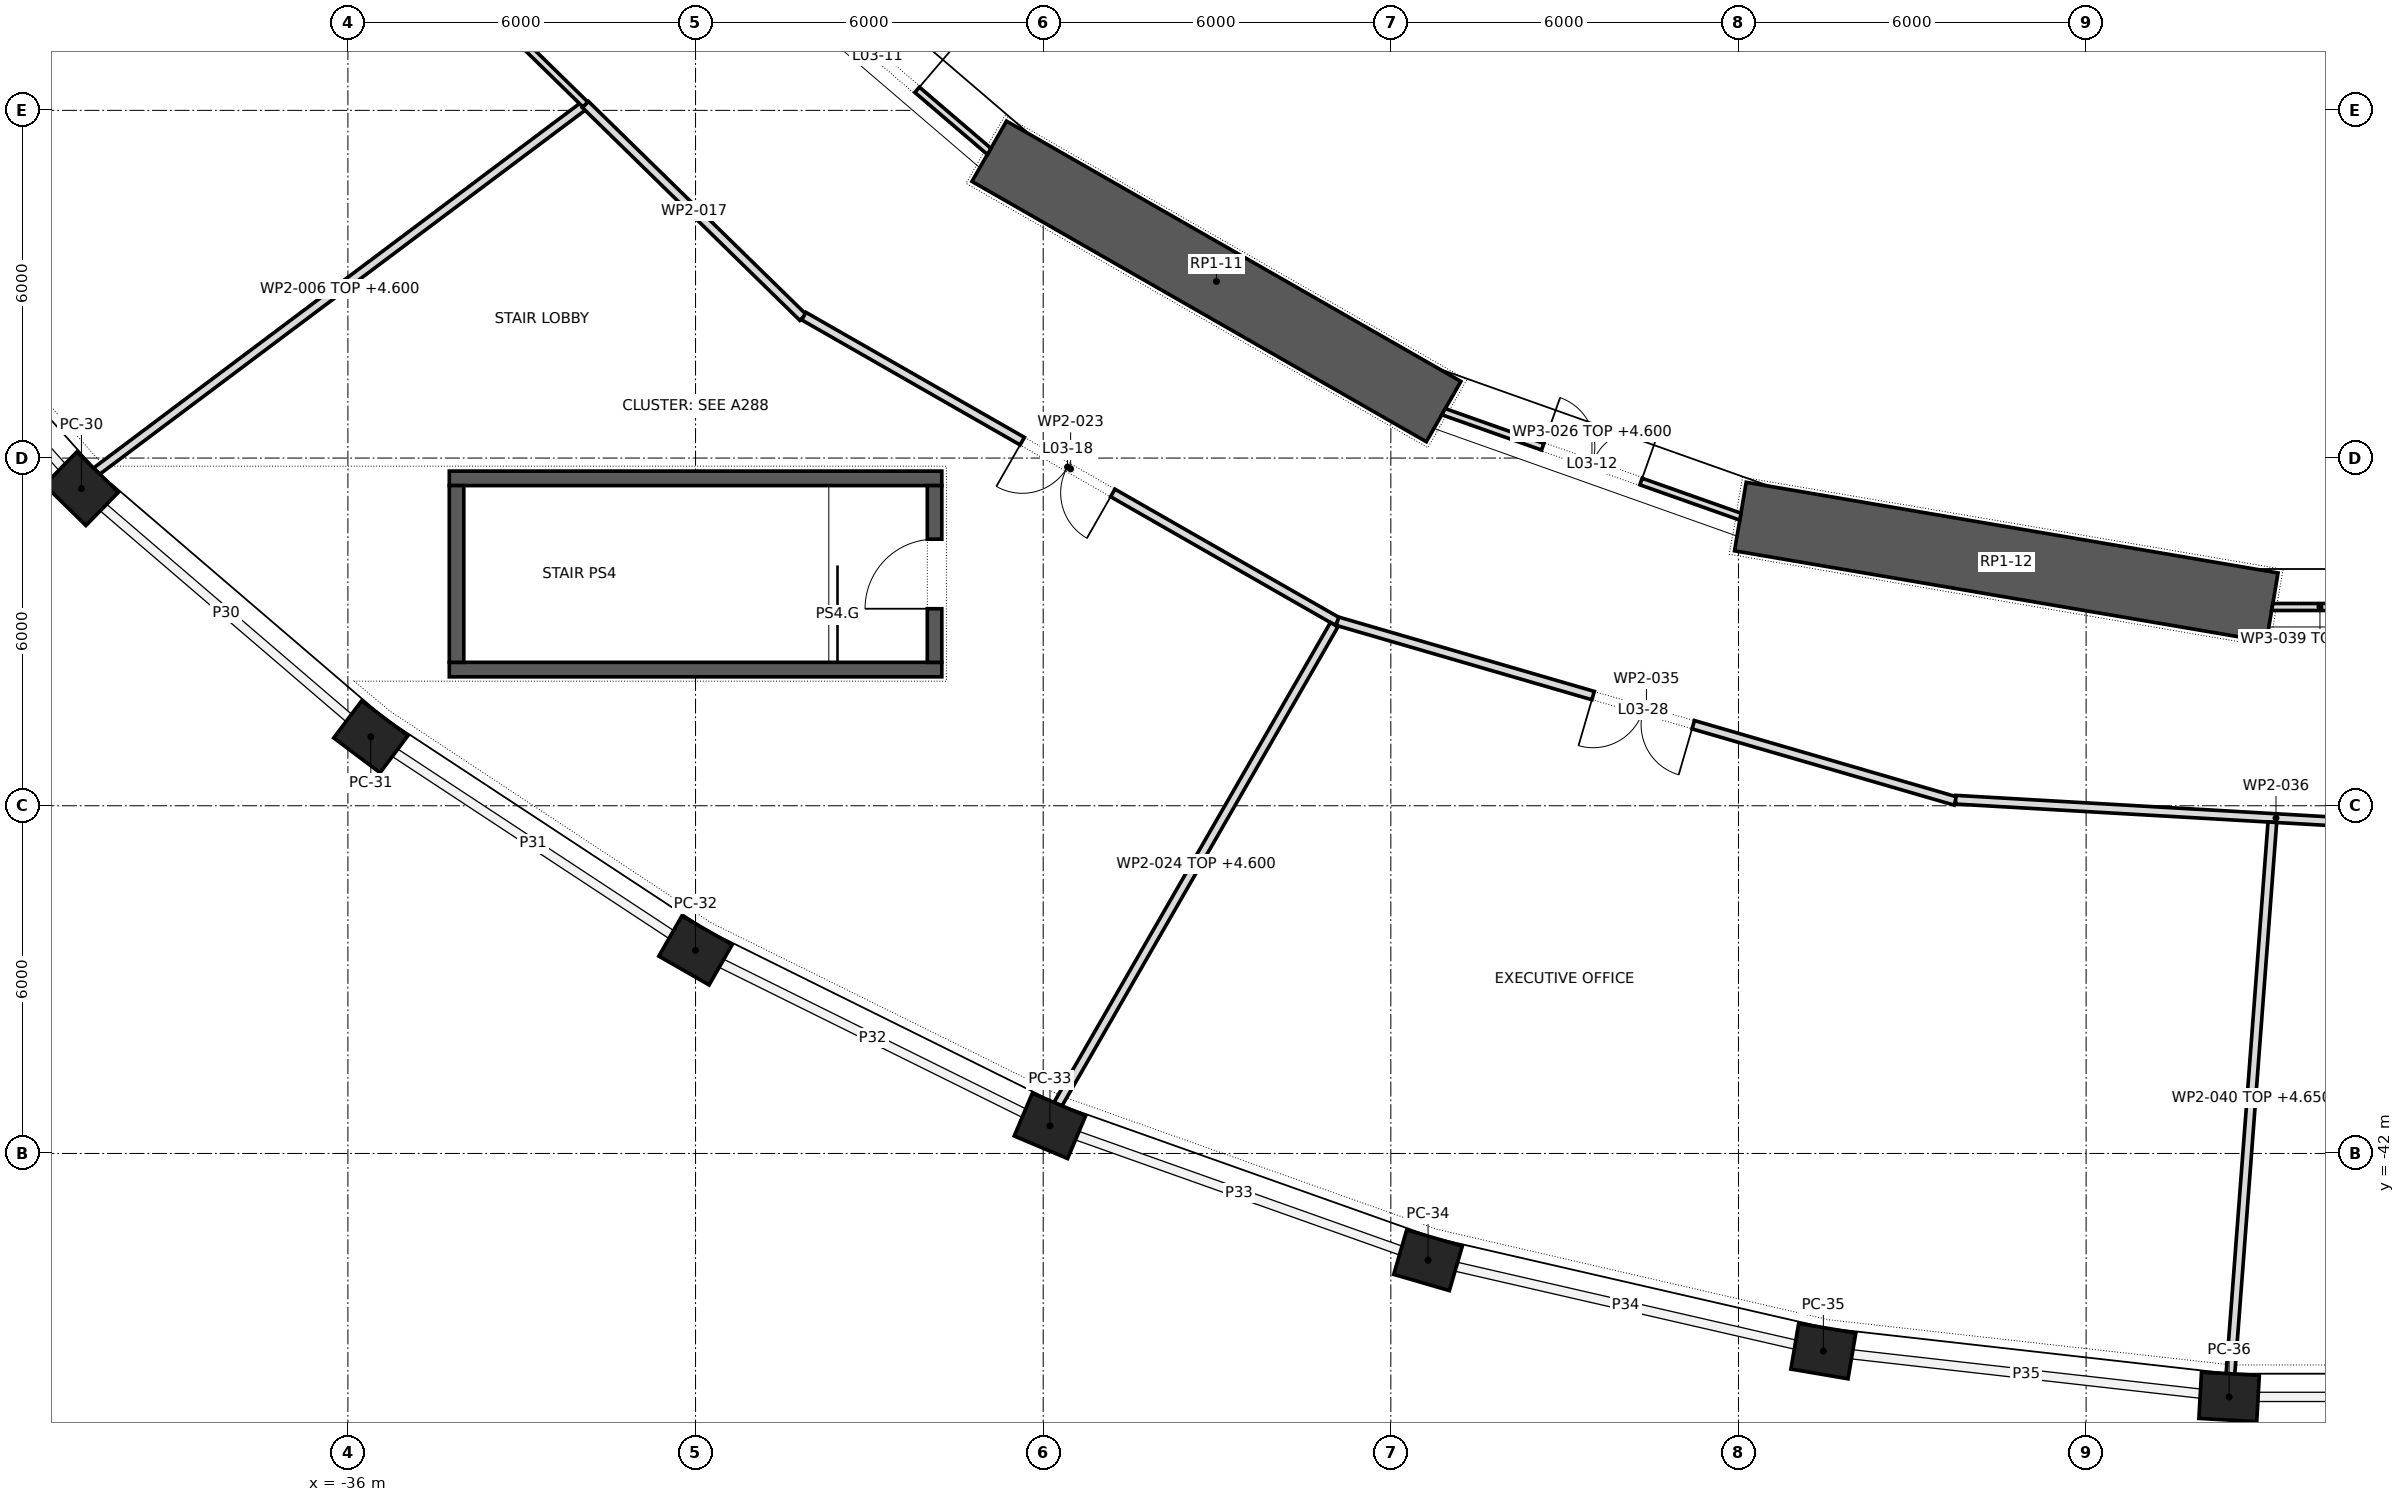
"""IFC4 building model, lengths in metres.
Left out: names, types, materials, properties, quantities, classifications, styles, units other than length and angle.
Written with IfcOpenShell. Run it as: python <this file> out.ifc"""

import sys

from ifc_helpers import new_model, si_unit, direction, frame, frame_2d, origin, origin_2d, place, context, subcontext, project, spatial, polyline, rectangle, outline, extrude, element, fill, save


model = new_model("IFC4")
c1 = context("Model", 3, precision=1e-05, world=origin(), true_north=direction((0.0, 1.0)))
c2 = subcontext(c1, "Body", "Model", "MODEL_VIEW")
j1 = project(units=[si_unit("LENGTHUNIT", "METRE"), si_unit("PLANEANGLEUNIT", "RADIAN")], contexts=[c1])
p1 = place(None, origin())
s1 = spatial("IfcSite", under=j1, at=p1, CompositionType="ELEMENT")
p2 = place(p1, origin())
s2 = spatial("IfcBuilding", under=s1, at=p2, CompositionType="ELEMENT")
p3 = place(p2, frame((0.0, 0.0, 18.0)))
s3 = spatial("IfcBuildingStorey", under=s2, at=p3, CompositionType="ELEMENT", Elevation=18.0)
for number, where, z_axis, x_axis in (
    (1, (-40.599, -30.528, 0.0), (0.0, 0.0, 1.0), (0.715, -0.699, 0.0)),
    (2, (-35.605, -34.81, 0.0), (0.0, 0.0, 1.0), (0.799, -0.601, 0.0)),
    (3, (-30.001, -38.497, 0.0), (0.0, 0.0, 1.0), (0.868, -0.497, 0.0)),
    (4, (-23.884, -41.525, 0.0), (0.0, 0.0, 1.0), (0.921, -0.389, 0.0)),
    (5, (-17.358, -43.843, 0.0), (0.0, 0.0, 1.0), (0.96, -0.279, 0.0)),
    (6, (-10.535, -45.41, 0.0), (0.0, 0.0, 1.0), (0.986, -0.168, 0.0)),
    (7, (-3.532, -46.201, 0.0), (0.0, 0.0, 1.0), (0.998, -0.056, 0.0)),
):
    element("IfcColumn", number, at=place(p3, frame(where, z_axis=z_axis, x_axis=x_axis)), inside=s3, PredefinedType="COLUMN", context=c2, shape_type="SweptSolid", body=[
        extrude(rectangle(XDim=1.0, YDim=0.8, at=origin_2d()), origin(), (0.0, 0.0, 1.0), 5.5),
    ])
p4 = place(p3, frame((-24.931, -24.706, 0.0), z_axis=(0.0, 0.0, 1.0), x_axis=(0.867760656864, -0.496982336103, 0.0)))
e8 = element("IfcWall", 8, at=p4, inside=s3, PredefinedType="SHEAR", context=c2, shape_type="SweptSolid", body=[
    extrude(rectangle(XDim=9.038, YDim=1.2, at=frame_2d((4.519, 0.0))), origin(), (0.0, 0.0, 1.0), 5.5),
])
p5 = place(p3, frame((-11.967, -31.009, 0.0), z_axis=(0.0, 0.0, 1.0), x_axis=(0.985776286846, -0.168062822456, 0.0)))
e9 = element("IfcWall", 9, at=p5, inside=s3, PredefinedType="SHEAR", context=c2, shape_type="SweptSolid", body=[
    extrude(rectangle(XDim=9.312, YDim=1.2, at=frame_2d((4.656, 0.0))), origin(), (0.0, 0.0, 1.0), 5.5),
])
for number, where, z_axis, x_axis in (
    (10, (-34.25, -30.35, 0.0), (0.0, 0.0, 1.0), (1.0, 0.0, 0.0)),
    (11, (-34.25, -33.65, 0.0), (0.0, 0.0, 1.0), (1.0, 0.0, 0.0)),
):
    element("IfcWall", number, at=place(p3, frame(where, z_axis=z_axis, x_axis=x_axis)), inside=s3, PredefinedType="SHEAR", context=c2, shape_type="SweptSolid", body=[
        extrude(rectangle(XDim=8.5, YDim=0.25, at=frame_2d((4.25, 0.0))), origin(), (0.0, 0.0, 1.0), 5.2),
    ])
p6 = place(p3, frame((-34.125, -33.525, 0.0), z_axis=(0.0, 0.0, 1.0), x_axis=(0.0, 1.0, 0.0)))
e12 = element("IfcWall", 12, at=p6, inside=s3, PredefinedType="SHEAR", context=c2, shape_type="SweptSolid", body=[
    extrude(rectangle(XDim=3.05, YDim=0.25, at=frame_2d((1.525, 0.0))), origin(), (0.0, 0.0, 1.0), 5.2),
])
p7 = place(p3, frame((-25.875, -33.525, 0.0), z_axis=(0.0, 0.0, 1.0), x_axis=(0.0, 1.0, 0.0)))
e13 = element("IfcWall", 13, at=p7, inside=s3, PredefinedType="SHEAR", context=c2, shape_type="SweptSolid", body=[
    extrude(rectangle(XDim=3.05, YDim=0.25, at=frame_2d((1.525, 0.0))), origin(), (0.0, 0.0, 1.0), 5.2),
])
p8 = place(p7, frame((0.925, 0.0, 0.0)))
e14 = element("IfcOpeningElement", 14, at=p8, cuts=e13, PredefinedType="OPENING", context=c2, shape_type="SweptSolid", body=[
    extrude(rectangle(XDim=1.2, YDim=2.1, at=frame_2d((0.6, 1.05))), frame((0.0, 0.137, 0.0), z_axis=(0.0, -1.0, 0.0), x_axis=(1.0, 0.0, 0.0)), (0.0, 0.0, 1.0), 0.274),
])
p9 = place(p3, frame((-40.337, -30.226, 0.0), z_axis=(0.0, 0.0, 1.0), x_axis=(0.800114543622, 0.599847244792, 0.0)))
e15 = element("IfcWall", 15, at=p9, inside=s3, PredefinedType="PARTITIONING", context=c2, shape_type="SweptSolid", body=[
    extrude(outline(polyline([(0.011, -0.075), (10.485, -0.075), (10.485, 0.075), (-0.011, 0.075), (0.011, -0.075)])), origin(), (0.0, 0.0, 1.0), 4.6),
])
p10 = place(p3, frame((-35.51, -20.369, 0.0), z_axis=(0.0, 0.0, 1.0), x_axis=(0.714847158957, -0.699280729987, 0.0)))
e16 = element("IfcWall", 16, at=p10, inside=s3, PredefinedType="PARTITIONING", context=c2, shape_type="SweptSolid", body=[
    extrude(rectangle(XDim=5.05, YDim=0.12, at=frame_2d((2.525, 0.0))), origin(), (0.0, 0.0, 1.0), 5.2),
])
p11 = place(p3, frame((-31.9, -23.9, 0.0), z_axis=(0.0, 0.0, 1.0), x_axis=(0.714809256367, -0.699319474212, 0.0)))
e17 = element("IfcWall", 17, at=p11, inside=s3, PredefinedType="PARTITIONING", context=c2, shape_type="SweptSolid", body=[
    extrude(rectangle(XDim=5.249, YDim=0.15, at=frame_2d((2.624, 0.0))), origin(), (0.0, 0.0, 1.0), 5.2),
])
p12 = place(p3, frame((-28.789, -21.411, 0.0), z_axis=(0.0, 0.0, 1.0), x_axis=(0.760084552743, -0.649824185978, 0.0)))
e18 = element("IfcWall", 18, at=p12, inside=s3, PredefinedType="PARTITIONING", context=c2, shape_type="SweptSolid", body=[
    extrude(outline(polyline([(-0.012, -0.06), (5.086, -0.06), (5.063, 0.06), (0.012, 0.06), (-0.012, -0.06)])), origin(), (0.0, 0.0, 1.0), 4.6),
])
p13 = place(p12, frame((1.638, 0.0, 0.0)))
e19 = element("IfcOpeningElement", 19, at=p13, cuts=e18, PredefinedType="OPENING", context=c2, shape_type="SweptSolid", body=[
    extrude(rectangle(XDim=1.8, YDim=2.1, at=frame_2d((0.9, 1.05))), frame((0.0, 0.072, 0.0), z_axis=(0.0, -1.0, 0.0), x_axis=(1.0, 0.0, 0.0)), (0.0, 0.0, 1.0), 0.144),
])
p14 = place(p3, frame((-18.922, -32.82, 0.0), z_axis=(0.0, 0.0, 1.0), x_axis=(-0.867956944139, 0.496639449823, 0.0)))
e20 = element("IfcWall", 20, at=p14, inside=s3, PredefinedType="PARTITIONING", context=c2, shape_type="SweptSolid", body=[
    extrude(rectangle(XDim=10.609, YDim=0.15, at=frame_2d((5.305, 0.0))), origin(), (0.0, 0.0, 1.0), 5.2),
])
p15 = place(p14, frame((4.466, 0.0, 0.0)))
e21 = element("IfcOpeningElement", 21, at=p15, cuts=e20, PredefinedType="OPENING", context=c2, shape_type="SweptSolid", body=[
    extrude(rectangle(XDim=1.8, YDim=2.1, at=frame_2d((0.9, 1.05))), frame((0.0, 0.087, 0.0), z_axis=(0.0, -1.0, 0.0), x_axis=(1.0, 0.0, 0.0)), (0.0, 0.0, 1.0), 0.174),
])
p16 = place(p3, frame((-18.977, -32.875, 0.0), z_axis=(0.0, 0.0, 1.0), x_axis=(-0.499235523932, -0.866466324588, 0.0)))
e22 = element("IfcWall", 22, at=p16, inside=s3, PredefinedType="PARTITIONING", context=c2, shape_type="SweptSolid", body=[
    extrude(outline(polyline([(0.0, -0.075), (9.56, -0.075), (9.542, 0.075), (0.0, 0.075), (0.0, -0.075)])), origin(), (0.0, 0.0, 1.0), 4.6),
])
p17 = place(p3, frame((-17.091, -29.2, 0.0), z_axis=(0.0, 0.0, 1.0), x_axis=(0.942814385805, -0.333318217204, 0.0)))
e23 = element("IfcWall", 23, at=p17, inside=s3, PredefinedType="PARTITIONING", context=c2, shape_type="SweptSolid", body=[
    extrude(outline(polyline([(-0.011, -0.06), (5.445, -0.06), (5.425, 0.06), (0.011, 0.06), (-0.011, -0.06)])), origin(), (0.0, 0.0, 1.0), 4.6),
])
p18 = place(p17, frame((1.816, 0.0, 0.0)))
e24 = element("IfcOpeningElement", 24, at=p18, cuts=e23, PredefinedType="OPENING", context=c2, shape_type="SweptSolid", body=[
    extrude(rectangle(XDim=1.8, YDim=2.1, at=frame_2d((0.9, 1.05))), frame((0.0, 0.072, 0.0), z_axis=(0.0, -1.0, 0.0), x_axis=(1.0, 0.0, 0.0)), (0.0, 0.0, 1.0), 0.144),
])
p19 = place(p3, frame((-8.256, -35.917, 0.0), z_axis=(0.0, 0.0, 1.0), x_axis=(-0.960212446938, 0.279270579805, 0.0)))
e25 = element("IfcWall", 25, at=p19, inside=s3, PredefinedType="PARTITIONING", context=c2, shape_type="SweptSolid", body=[
    extrude(rectangle(XDim=11.106, YDim=0.15, at=frame_2d((5.553, 0.0))), origin(), (0.0, 0.0, 1.0), 5.2),
])
p20 = place(p19, frame((4.712, 0.0, 0.0)))
e26 = element("IfcOpeningElement", 26, at=p20, cuts=e25, PredefinedType="OPENING", context=c2, shape_type="SweptSolid", body=[
    extrude(rectangle(XDim=1.8, YDim=2.1, at=frame_2d((0.9, 1.05))), frame((0.0, 0.087, 0.0), z_axis=(0.0, -1.0, 0.0), x_axis=(1.0, 0.0, 0.0)), (0.0, 0.0, 1.0), 0.174),
])
p21 = place(p3, frame((-8.251, -35.896, 0.0), z_axis=(0.0, 0.0, 1.0), x_axis=(0.998353419448, -0.057362443082, 0.0)))
e27 = element("IfcWall", 27, at=p21, inside=s3, PredefinedType="PARTITIONING", context=c2, shape_type="SweptSolid", body=[
    extrude(rectangle(XDim=11.074, YDim=0.15, at=frame_2d((5.537, 0.0))), origin(), (0.0, 0.0, 1.0), 5.2),
])
p22 = place(p3, frame((-2.788, -32.57, 0.0), z_axis=(0.0, 0.0, 1.0), x_axis=(1.0, 0.0, 0.0)))
e28 = element("IfcWall", 28, at=p22, inside=s3, PredefinedType="PARTITIONING", context=c2, shape_type="SweptSolid", body=[
    extrude(outline(polyline([(-0.01, -0.06), (1.648, -0.06), (1.648, 0.06), (0.01, 0.06), (-0.01, -0.06)])), origin(), (0.0, 0.0, 1.0), 4.6),
])
p23 = place(p3, frame((-2.786, -36.284, 0.0), z_axis=(0.0, 0.0, 1.0), x_axis=(-0.075755724104, -0.997126406363, 0.0)))
e29 = element("IfcWall", 29, at=p23, inside=s3, PredefinedType="PARTITIONING", context=c2, shape_type="SweptSolid", body=[
    extrude(rectangle(XDim=9.546, YDim=0.15, at=frame_2d((4.773, 0.0))), origin(), (0.0, 0.0, 1.0), 4.65),
])
p24 = place(p8, origin())
e30 = element("IfcDoor", 30, at=p24, inside=s3, OperationType="SINGLE_SWING_RIGHT", PredefinedType="DOOR", context=c2, shape_type="SweptSolid", body=[
    extrude(rectangle(XDim=1.2, YDim=2.1, at=frame_2d((0.6, 1.05))), frame((0.0, 0.025, 0.0), z_axis=(0.0, -1.0, 0.0), x_axis=(1.0, 0.0, 0.0)), (0.0, 0.0, 1.0), 0.05),
])
fill(e14, e30)
p25 = place(p13, origin())
e31 = element("IfcDoor", 31, at=p25, inside=s3, OperationType="DOUBLE_DOOR_SINGLE_SWING", PredefinedType="DOOR", context=c2, shape_type="SweptSolid", body=[
    extrude(rectangle(XDim=1.8, YDim=2.1, at=frame_2d((0.9, 1.05))), frame((0.0, 0.025, 0.0), z_axis=(0.0, -1.0, 0.0), x_axis=(1.0, 0.0, 0.0)), (0.0, 0.0, 1.0), 0.05),
])
fill(e19, e31)
p26 = place(p18, origin())
e32 = element("IfcDoor", 32, at=p26, inside=s3, OperationType="DOUBLE_DOOR_SINGLE_SWING", PredefinedType="DOOR", context=c2, shape_type="SweptSolid", body=[
    extrude(rectangle(XDim=1.8, YDim=2.1, at=frame_2d((0.9, 1.05))), frame((0.0, 0.025, 0.0), z_axis=(0.0, -1.0, 0.0), x_axis=(1.0, 0.0, 0.0)), (0.0, 0.0, 1.0), 0.05),
])
fill(e24, e32)
p27 = place(p15, origin())
e33 = element("IfcDoor", 33, at=p27, inside=s3, OperationType="DOUBLE_DOOR_SINGLE_SWING", PredefinedType="DOOR", context=c2, shape_type="SweptSolid", body=[
    extrude(rectangle(XDim=1.8, YDim=2.1, at=frame_2d((0.9, 1.05))), frame((0.0, 0.025, 0.0), z_axis=(0.0, -1.0, 0.0), x_axis=(1.0, 0.0, 0.0)), (0.0, 0.0, 1.0), 0.05),
])
fill(e21, e33)
p28 = place(p20, origin())
e34 = element("IfcDoor", 34, at=p28, inside=s3, OperationType="DOUBLE_DOOR_SINGLE_SWING", PredefinedType="DOOR", context=c2, shape_type="SweptSolid", body=[
    extrude(rectangle(XDim=1.8, YDim=2.1, at=frame_2d((0.9, 1.05))), frame((0.0, 0.025, 0.0), z_axis=(0.0, -1.0, 0.0), x_axis=(1.0, 0.0, 0.0)), (0.0, 0.0, 1.0), 0.05),
])
fill(e26, e34)
save(model, sys.argv[1])
